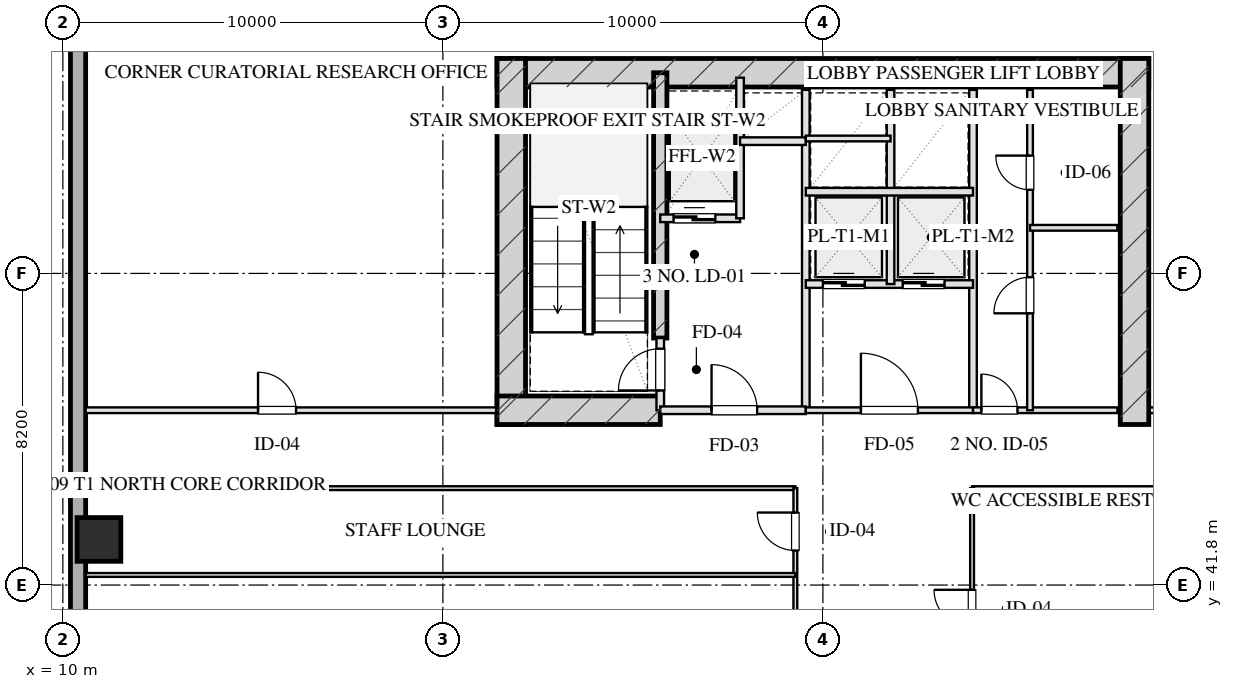
"""IFC4 building model, lengths in metres.
Left out: names, types, materials, properties, quantities, classifications, styles, units other than length and angle.
Written with IfcOpenShell. Run it as: python <this file> out.ifc"""

import sys

from ifc_helpers import new_model, si_unit, direction, frame, frame_2d, origin, origin_2d, place, context, subcontext, project, spatial, rectangle, hollow_rectangle, extrude, element, fill, save


model = new_model("IFC4")
c1 = context("Model", 3, precision=1e-05, world=origin(), true_north=direction((0.0, 1.0)))
c2 = subcontext(c1, "Body", "Model", "MODEL_VIEW")
j1 = project(units=[si_unit("LENGTHUNIT", "METRE"), si_unit("PLANEANGLEUNIT", "RADIAN")], contexts=[c1])
p1 = place(None, origin())
s1 = spatial("IfcSite", under=j1, at=p1, CompositionType="ELEMENT")
p2 = place(p1, origin())
s2 = spatial("IfcBuilding", under=s1, at=p2, CompositionType="ELEMENT")
p3 = place(p2, frame((0.0, 0.0, 42.0)))
s3 = spatial("IfcBuildingStorey", under=s2, at=p3, CompositionType="ELEMENT", Elevation=42.0)
p4 = place(p3, frame((21.425, 55.28, 0.0), z_axis=(0.0, 0.0, 1.0), x_axis=(1.0, 0.0, 0.0)))
e1 = element("IfcWall", 1, at=p4, inside=s3, PredefinedType="SHEAR", context=c2, shape_type="SweptSolid", body=[
    extrude(rectangle(XDim=17.15, YDim=0.75, at=frame_2d((8.575, 0.0))), origin(), (0.0, 0.0, 1.0), 4.0),
])
for number, where, z_axis, x_axis in (
    (2, (21.8, 46.025, 0.0), (0.0, 0.0, 1.0), (0.0, 1.0, 0.0)),
    (3, (38.2, 46.025, 0.0), (0.0, 0.0, 1.0), (0.0, 1.0, 0.0)),
):
    element("IfcWall", number, at=place(p3, frame(where, z_axis=z_axis, x_axis=x_axis)), inside=s3, PredefinedType="SHEAR", context=c2, shape_type="SweptSolid", body=[
        extrude(rectangle(XDim=9.63, YDim=0.75, at=frame_2d((4.815, 0.0))), origin(), (0.0, 0.0, 1.0), 4.0),
    ])
p5 = place(p3, frame((25.72, 48.3, 0.0), z_axis=(0.0, 0.0, 1.0), x_axis=(0.0, 1.0, 0.0)))
e4 = element("IfcWall", 4, at=p5, inside=s3, PredefinedType="SHEAR", context=c2, shape_type="SweptSolid", body=[
    extrude(rectangle(XDim=6.98, YDim=0.35, at=frame_2d((3.49, 0.0))), origin(), (0.0, 0.0, 1.0), 4.0),
])
p6 = place(p3, frame((21.425, 46.4, 0.0), z_axis=(0.0, 0.0, 1.0), x_axis=(1.0, 0.0, 0.0)))
e5 = element("IfcWall", 5, at=p6, inside=s3, PredefinedType="SHEAR", context=c2, shape_type="SweptSolid", body=[
    extrude(rectangle(XDim=4.295, YDim=0.75, at=frame_2d((2.147, 0.0))), origin(), (0.0, 0.0, 1.0), 4.0),
])
p7 = place(p3, frame((10.95, 43.0, 0.0), z_axis=(0.0, 0.0, 1.0), x_axis=(1.0, 0.0, 0.0)))
e6 = element("IfcColumn", 6, at=p7, inside=s3, PredefinedType="COLUMN", context=c2, shape_type="SweptSolid", body=[
    extrude(hollow_rectangle(XDim=1.15, YDim=1.15, WallThickness=0.04, at=origin_2d()), origin(), (0.0, 0.0, 1.0), 4.001),
])
p8 = place(p3, frame((10.4, 7.2, 0.0), z_axis=(0.0, 0.0, 1.0), x_axis=(0.0, 1.0, 0.0)))
e7 = element("IfcWall", 7, at=p8, inside=s3, PredefinedType="SOLIDWALL", context=c2, shape_type="SweptSolid", body=[
    extrude(rectangle(XDim=53.6, YDim=0.4, at=frame_2d((26.8, 0.0))), origin(), (0.0, 0.0, 1.0), 3.1),
])
p9 = place(p8, frame((28.15, 0.0, 0.75)))
e8 = element("IfcOpeningElement", 8, at=p9, cuts=e7, PredefinedType="OPENING", context=c2, shape_type="SweptSolid", body=[
    extrude(rectangle(XDim=2.5, YDim=1.75, at=frame_2d((1.25, 0.875))), frame((0.0, 0.21, 0.0), z_axis=(0.0, -1.0, 0.0), x_axis=(1.0, 0.0, 0.0)), (0.0, 0.0, 1.0), 0.42),
])
p10 = place(p3, frame((25.72, 46.4, 0.0), z_axis=(0.0, 0.0, 1.0), x_axis=(0.0, 1.0, 0.0)))
e9 = element("IfcWall", 9, at=p10, inside=s3, PredefinedType="PARTITIONING", context=c2, shape_type="SweptSolid", body=[
    extrude(rectangle(XDim=1.9, YDim=0.2, at=frame_2d((0.95, 0.0))), origin(), (0.0, 0.0, 1.0), 3.705),
])
p11 = place(p10, frame((0.52, 0.0, 0.0)))
e10 = element("IfcOpeningElement", 10, at=p11, cuts=e9, PredefinedType="OPENING", context=c2, shape_type="SweptSolid", body=[
    extrude(rectangle(XDim=1.1, YDim=2.05, at=frame_2d((0.55, 1.025))), frame((0.0, 0.11, 0.0), z_axis=(0.0, -1.0, 0.0), x_axis=(1.0, 0.0, 0.0)), (0.0, 0.0, 1.0), 0.22),
])
p12 = place(p3, frame((29.55, 46.4, 0.0), z_axis=(0.0, 0.0, 1.0), x_axis=(0.0, 1.0, 0.0)))
e11 = element("IfcWall", 11, at=p12, inside=s3, PredefinedType="PARTITIONING", context=c2, shape_type="SweptSolid", body=[
    extrude(rectangle(XDim=8.43, YDim=0.2, at=frame_2d((4.215, 0.0))), origin(), (0.0, 0.0, 1.0), 3.705),
])
p13 = place(p3, frame((25.72, 46.4, 0.0), z_axis=(0.0, 0.0, 1.0), x_axis=(1.0, 0.0, 0.0)))
e12 = element("IfcWall", 12, at=p13, inside=s3, PredefinedType="PARTITIONING", context=c2, shape_type="SweptSolid", body=[
    extrude(rectangle(XDim=3.83, YDim=0.2, at=frame_2d((1.915, 0.0))), origin(), (0.0, 0.0, 1.0), 3.705),
])
p14 = place(p13, frame((1.35, 0.0, 0.0)))
e13 = element("IfcOpeningElement", 13, at=p14, cuts=e12, PredefinedType="OPENING", context=c2, shape_type="SweptSolid", body=[
    extrude(rectangle(XDim=1.2, YDim=2.05, at=frame_2d((0.6, 1.025))), frame((0.0, 0.11, 0.0), z_axis=(0.0, -1.0, 0.0), x_axis=(1.0, 0.0, 0.0)), (0.0, 0.0, 1.0), 0.22),
])
p15 = place(p3, frame((25.72, 51.45, 0.0), z_axis=(0.0, 0.0, 1.0), x_axis=(1.0, 0.0, 0.0)))
e14 = element("IfcWall", 14, at=p15, inside=s3, PredefinedType="PARTITIONING", context=c2, shape_type="SweptSolid", body=[
    extrude(rectangle(XDim=2.1, YDim=0.2, at=frame_2d((1.05, 0.0))), origin(), (0.0, 0.0, 1.0), 3.705),
])
p16 = place(p15, frame((0.35, 0.0, 0.0)))
e15 = element("IfcOpeningElement", 15, at=p16, cuts=e14, PredefinedType="OPENING", context=c2, shape_type="SweptSolid", body=[
    extrude(rectangle(XDim=1.1, YDim=2.05, at=frame_2d((0.55, 1.025))), frame((0.0, 0.11, 0.0), z_axis=(0.0, -1.0, 0.0), x_axis=(1.0, 0.0, 0.0)), (0.0, 0.0, 1.0), 0.22),
])
p17 = place(p3, frame((27.82, 51.45, 0.0), z_axis=(0.0, 0.0, 1.0), x_axis=(0.0, 1.0, 0.0)))
e16 = element("IfcWall", 16, at=p17, inside=s3, PredefinedType="PARTITIONING", context=c2, shape_type="SweptSolid", body=[
    extrude(rectangle(XDim=3.7, YDim=0.2, at=frame_2d((1.85, 0.0))), origin(), (0.0, 0.0, 1.0), 3.705),
])
p18 = place(p3, frame((27.82, 53.48, 0.0), z_axis=(0.0, 0.0, 1.0), x_axis=(1.0, 0.0, 0.0)))
e17 = element("IfcWall", 17, at=p18, inside=s3, PredefinedType="PARTITIONING", context=c2, shape_type="SweptSolid", body=[
    extrude(rectangle(XDim=1.73, YDim=0.2, at=frame_2d((0.865, 0.0))), origin(), (0.0, 0.0, 1.0), 3.705),
])
p19 = place(p3, frame((33.95, 46.4, 0.0), z_axis=(0.0, 0.0, 1.0), x_axis=(0.0, 1.0, 0.0)))
e18 = element("IfcWall", 18, at=p19, inside=s3, PredefinedType="PARTITIONING", context=c2, shape_type="SweptSolid", body=[
    extrude(rectangle(XDim=8.43, YDim=0.2, at=frame_2d((4.215, 0.0))), origin(), (0.0, 0.0, 1.0), 3.705),
])
p20 = place(p3, frame((29.55, 46.4, 0.0), z_axis=(0.0, 0.0, 1.0), x_axis=(1.0, 0.0, 0.0)))
e19 = element("IfcWall", 19, at=p20, inside=s3, PredefinedType="PARTITIONING", context=c2, shape_type="SweptSolid", body=[
    extrude(rectangle(XDim=4.4, YDim=0.15, at=frame_2d((2.2, 0.0))), origin(), (0.0, 0.0, 1.0), 3.705),
])
p21 = place(p20, frame((1.45, 0.0, 0.0)))
e20 = element("IfcOpeningElement", 20, at=p21, cuts=e19, PredefinedType="OPENING", context=c2, shape_type="SweptSolid", body=[
    extrude(rectangle(XDim=1.5, YDim=2.05, at=frame_2d((0.75, 1.025))), frame((0.0, 0.085, 0.0), z_axis=(0.0, -1.0, 0.0), x_axis=(1.0, 0.0, 0.0)), (0.0, 0.0, 1.0), 0.17),
])
p22 = place(p3, frame((29.55, 49.72, 0.0), z_axis=(0.0, 0.0, 1.0), x_axis=(1.0, 0.0, 0.0)))
e21 = element("IfcWall", 21, at=p22, inside=s3, PredefinedType="PARTITIONING", context=c2, shape_type="SweptSolid", body=[
    extrude(rectangle(XDim=4.4, YDim=0.2, at=frame_2d((2.2, 0.0))), origin(), (0.0, 0.0, 1.0), 3.705),
])
p23 = place(p22, frame((0.45, 0.0, 0.0)))
e22 = element("IfcOpeningElement", 22, at=p23, cuts=e21, PredefinedType="OPENING", context=c2, shape_type="SweptSolid", body=[
    extrude(rectangle(XDim=1.1, YDim=2.05, at=frame_2d((0.55, 1.025))), frame((0.0, 0.11, 0.0), z_axis=(0.0, -1.0, 0.0), x_axis=(1.0, 0.0, 0.0)), (0.0, 0.0, 1.0), 0.22),
])
p24 = place(p22, frame((2.55, 0.0, 0.0)))
e23 = element("IfcOpeningElement", 23, at=p24, cuts=e21, PredefinedType="OPENING", context=c2, shape_type="SweptSolid", body=[
    extrude(rectangle(XDim=1.1, YDim=2.05, at=frame_2d((0.55, 1.025))), frame((0.0, 0.11, 0.0), z_axis=(0.0, -1.0, 0.0), x_axis=(1.0, 0.0, 0.0)), (0.0, 0.0, 1.0), 0.22),
])
p25 = place(p3, frame((31.78, 49.72, 0.0), z_axis=(0.0, 0.0, 1.0), x_axis=(0.0, 1.0, 0.0)))
e24 = element("IfcWall", 24, at=p25, inside=s3, PredefinedType="PARTITIONING", context=c2, shape_type="SweptSolid", body=[
    extrude(rectangle(XDim=5.11, YDim=0.2, at=frame_2d((2.555, 0.0))), origin(), (0.0, 0.0, 1.0), 3.705),
])
p26 = place(p3, frame((29.55, 52.15, 0.0), z_axis=(0.0, 0.0, 1.0), x_axis=(1.0, 0.0, 0.0)))
e25 = element("IfcWall", 25, at=p26, inside=s3, PredefinedType="PARTITIONING", context=c2, shape_type="SweptSolid", body=[
    extrude(rectangle(XDim=4.4, YDim=0.2, at=frame_2d((2.2, 0.0))), origin(), (0.0, 0.0, 1.0), 3.705),
])
p27 = place(p3, frame((29.55, 53.55, 0.0), z_axis=(0.0, 0.0, 1.0), x_axis=(1.0, 0.0, 0.0)))
e26 = element("IfcWall", 26, at=p27, inside=s3, PredefinedType="PARTITIONING", context=c2, shape_type="SweptSolid", body=[
    extrude(rectangle(XDim=2.23, YDim=0.15, at=frame_2d((1.115, 0.0))), origin(), (0.0, 0.0, 1.0), 3.705),
])
p28 = place(p3, frame((33.95, 46.4, 0.0), z_axis=(0.0, 0.0, 1.0), x_axis=(1.0, 0.0, 0.0)))
e27 = element("IfcWall", 27, at=p28, inside=s3, PredefinedType="PARTITIONING", context=c2, shape_type="SweptSolid", body=[
    extrude(rectangle(XDim=3.8, YDim=0.15, at=frame_2d((1.9, 0.0))), origin(), (0.0, 0.0, 1.0), 3.705),
])
p29 = place(p28, frame((0.22, 0.0, 0.0)))
e28 = element("IfcOpeningElement", 28, at=p29, cuts=e27, PredefinedType="OPENING", context=c2, shape_type="SweptSolid", body=[
    extrude(rectangle(XDim=0.95, YDim=2.05, at=frame_2d((0.475, 1.025))), frame((0.0, 0.085, 0.0), z_axis=(0.0, -1.0, 0.0), x_axis=(1.0, 0.0, 0.0)), (0.0, 0.0, 1.0), 0.17),
])
p30 = place(p3, frame((35.45, 46.4, 0.0), z_axis=(0.0, 0.0, 1.0), x_axis=(0.0, 1.0, 0.0)))
e29 = element("IfcWall", 29, at=p30, inside=s3, PredefinedType="PARTITIONING", context=c2, shape_type="SweptSolid", body=[
    extrude(rectangle(XDim=8.43, YDim=0.15, at=frame_2d((4.215, 0.0))), origin(), (0.0, 0.0, 1.0), 3.345),
])
p31 = place(p30, frame((2.55, 0.0, 0.0)))
e30 = element("IfcOpeningElement", 30, at=p31, cuts=e29, PredefinedType="OPENING", context=c2, shape_type="SweptSolid", body=[
    extrude(rectangle(XDim=0.95, YDim=2.05, at=frame_2d((0.475, 1.025))), frame((0.0, 0.085, 0.0), z_axis=(0.0, -1.0, 0.0), x_axis=(1.0, 0.0, 0.0)), (0.0, 0.0, 1.0), 0.17),
])
p32 = place(p30, frame((5.8, 0.0, 0.0)))
e31 = element("IfcOpeningElement", 31, at=p32, cuts=e29, PredefinedType="OPENING", context=c2, shape_type="SweptSolid", body=[
    extrude(rectangle(XDim=0.9, YDim=2.05, at=frame_2d((0.45, 1.025))), frame((0.0, 0.085, 0.0), z_axis=(0.0, -1.0, 0.0), x_axis=(1.0, 0.0, 0.0)), (0.0, 0.0, 1.0), 0.17),
])
p33 = place(p3, frame((35.45, 51.2, 0.0), z_axis=(0.0, 0.0, 1.0), x_axis=(1.0, 0.0, 0.0)))
e32 = element("IfcWall", 32, at=p33, inside=s3, PredefinedType="PARTITIONING", context=c2, shape_type="SweptSolid", body=[
    extrude(rectangle(XDim=2.3, YDim=0.15, at=frame_2d((1.15, 0.0))), origin(), (0.0, 0.0, 1.0), 3.705),
])
p34 = place(p3, frame((10.6, 46.4, 0.0), z_axis=(0.0, 0.0, 1.0), x_axis=(1.0, 0.0, 0.0)))
e33 = element("IfcWall", 33, at=p34, inside=s3, PredefinedType="PARTITIONING", context=c2, shape_type="SweptSolid", body=[
    extrude(rectangle(XDim=10.8, YDim=0.15, at=frame_2d((5.4, 0.0))), origin(), (0.0, 0.0, 1.0), 3.705),
])
p35 = place(p34, frame((4.536, 0.0, 0.0)))
e34 = element("IfcOpeningElement", 34, at=p35, cuts=e33, PredefinedType="OPENING", context=c2, shape_type="SweptSolid", body=[
    extrude(rectangle(XDim=1.0, YDim=2.05, at=frame_2d((0.5, 1.025))), frame((0.0, 0.085, 0.0), z_axis=(0.0, -1.0, 0.0), x_axis=(1.0, 0.0, 0.0)), (0.0, 0.0, 1.0), 0.17),
])
p36 = place(p3, frame((38.6, 46.4, 0.0), z_axis=(0.0, 0.0, 1.0), x_axis=(1.0, 0.0, 0.0)))
e35 = element("IfcWall", 35, at=p36, inside=s3, PredefinedType="PARTITIONING", context=c2, shape_type="SweptSolid", body=[
    extrude(rectangle(XDim=10.8, YDim=0.15, at=frame_2d((5.4, 0.0))), origin(), (0.0, 0.0, 1.0), 3.705),
])
p37 = place(p36, frame((4.536, 0.0, 0.0)))
e36 = element("IfcOpeningElement", 36, at=p37, cuts=e35, PredefinedType="OPENING", context=c2, shape_type="SweptSolid", body=[
    extrude(rectangle(XDim=1.0, YDim=2.05, at=frame_2d((0.5, 1.025))), frame((0.0, 0.085, 0.0), z_axis=(0.0, -1.0, 0.0), x_axis=(1.0, 0.0, 0.0)), (0.0, 0.0, 1.0), 0.17),
])
p38 = place(p3, frame((10.6, 44.35, 0.0), z_axis=(0.0, 0.0, 1.0), x_axis=(1.0, 0.0, 0.0)))
e37 = element("IfcWall", 37, at=p38, inside=s3, PredefinedType="MOVABLE", context=c2, shape_type="SweptSolid", body=[
    extrude(rectangle(XDim=18.675, YDim=0.1, at=frame_2d((9.337, 0.0))), origin(), (0.0, 0.0, 1.0), 3.705),
])
p39 = place(p3, frame((33.925, 44.35, 0.0), z_axis=(0.0, 0.0, 1.0), x_axis=(1.0, 0.0, 0.0)))
e38 = element("IfcWall", 38, at=p39, inside=s3, PredefinedType="MOVABLE", context=c2, shape_type="SweptSolid", body=[
    extrude(rectangle(XDim=15.475, YDim=0.1, at=frame_2d((7.737, 0.0))), origin(), (0.0, 0.0, 1.0), 3.705),
])
p40 = place(p3, frame((29.275, 23.65, 0.0), z_axis=(0.0, 0.0, 1.0), x_axis=(0.0, 1.0, 0.0)))
e39 = element("IfcWall", 39, at=p40, inside=s3, PredefinedType="MOVABLE", context=c2, shape_type="SweptSolid", body=[
    extrude(rectangle(XDim=20.7, YDim=0.1, at=frame_2d((10.35, 0.0))), origin(), (0.0, 0.0, 1.0), 3.705),
])
p41 = place(p40, frame((0.775, 0.0, 0.0)))
e40 = element("IfcOpeningElement", 40, at=p41, cuts=e39, PredefinedType="OPENING", context=c2, shape_type="SweptSolid", body=[
    extrude(rectangle(XDim=1.0, YDim=2.05, at=frame_2d((0.5, 1.025))), frame((0.0, 0.06, 0.0), z_axis=(0.0, -1.0, 0.0), x_axis=(1.0, 0.0, 0.0)), (0.0, 0.0, 1.0), 0.12),
])
p42 = place(p40, frame((3.95, 0.0, 0.0)))
e41 = element("IfcOpeningElement", 41, at=p42, cuts=e39, PredefinedType="OPENING", context=c2, shape_type="SweptSolid", body=[
    extrude(rectangle(XDim=1.0, YDim=2.05, at=frame_2d((0.5, 1.025))), frame((0.0, 0.06, 0.0), z_axis=(0.0, -1.0, 0.0), x_axis=(1.0, 0.0, 0.0)), (0.0, 0.0, 1.0), 0.12),
])
p43 = place(p40, frame((8.364, 0.0, 0.0)))
e42 = element("IfcOpeningElement", 42, at=p43, cuts=e39, PredefinedType="OPENING", context=c2, shape_type="SweptSolid", body=[
    extrude(rectangle(XDim=1.0, YDim=2.05, at=frame_2d((0.5, 1.025))), frame((0.0, 0.06, 0.0), z_axis=(0.0, -1.0, 0.0), x_axis=(1.0, 0.0, 0.0)), (0.0, 0.0, 1.0), 0.12),
])
p44 = place(p40, frame((12.864, 0.0, 0.0)))
e43 = element("IfcOpeningElement", 43, at=p44, cuts=e39, PredefinedType="OPENING", context=c2, shape_type="SweptSolid", body=[
    extrude(rectangle(XDim=1.05, YDim=2.05, at=frame_2d((0.525, 1.025))), frame((0.0, 0.06, 0.0), z_axis=(0.0, -1.0, 0.0), x_axis=(1.0, 0.0, 0.0)), (0.0, 0.0, 1.0), 0.12),
])
p45 = place(p40, frame((16.383, 0.0, 0.0)))
e44 = element("IfcOpeningElement", 44, at=p45, cuts=e39, PredefinedType="OPENING", context=c2, shape_type="SweptSolid", body=[
    extrude(rectangle(XDim=0.85, YDim=2.05, at=frame_2d((0.425, 1.025))), frame((0.0, 0.06, 0.0), z_axis=(0.0, -1.0, 0.0), x_axis=(1.0, 0.0, 0.0)), (0.0, 0.0, 1.0), 0.12),
])
p46 = place(p40, frame((19.058, 0.0, 0.0)))
e45 = element("IfcOpeningElement", 45, at=p46, cuts=e39, PredefinedType="OPENING", context=c2, shape_type="SweptSolid", body=[
    extrude(rectangle(XDim=1.0, YDim=2.05, at=frame_2d((0.5, 1.025))), frame((0.0, 0.06, 0.0), z_axis=(0.0, -1.0, 0.0), x_axis=(1.0, 0.0, 0.0)), (0.0, 0.0, 1.0), 0.12),
])
p47 = place(p3, frame((33.925, 23.65, 0.0), z_axis=(0.0, 0.0, 1.0), x_axis=(0.0, 1.0, 0.0)))
e46 = element("IfcWall", 46, at=p47, inside=s3, PredefinedType="MOVABLE", context=c2, shape_type="SweptSolid", body=[
    extrude(rectangle(XDim=20.7, YDim=0.1, at=frame_2d((10.35, 0.0))), origin(), (0.0, 0.0, 1.0), 3.705),
])
p48 = place(p47, frame((2.675, 0.0, 0.0)))
e47 = element("IfcOpeningElement", 47, at=p48, cuts=e46, PredefinedType="OPENING", context=c2, shape_type="SweptSolid", body=[
    extrude(rectangle(XDim=1.0, YDim=2.05, at=frame_2d((0.5, 1.025))), frame((0.0, 0.06, 0.0), z_axis=(0.0, -1.0, 0.0), x_axis=(1.0, 0.0, 0.0)), (0.0, 0.0, 1.0), 0.12),
])
p49 = place(p47, frame((9.85, 0.0, 0.0)))
e48 = element("IfcOpeningElement", 48, at=p49, cuts=e46, PredefinedType="OPENING", context=c2, shape_type="SweptSolid", body=[
    extrude(rectangle(XDim=1.0, YDim=2.05, at=frame_2d((0.5, 1.025))), frame((0.0, 0.06, 0.0), z_axis=(0.0, -1.0, 0.0), x_axis=(1.0, 0.0, 0.0)), (0.0, 0.0, 1.0), 0.12),
])
p50 = place(p47, frame((17.025, 0.0, 0.0)))
e49 = element("IfcOpeningElement", 49, at=p50, cuts=e46, PredefinedType="OPENING", context=c2, shape_type="SweptSolid", body=[
    extrude(rectangle(XDim=1.0, YDim=2.05, at=frame_2d((0.5, 1.025))), frame((0.0, 0.06, 0.0), z_axis=(0.0, -1.0, 0.0), x_axis=(1.0, 0.0, 0.0)), (0.0, 0.0, 1.0), 0.12),
])
p51 = place(p3, frame((10.6, 42.066, 0.0), z_axis=(0.0, 0.0, 1.0), x_axis=(1.0, 0.0, 0.0)))
e50 = element("IfcWall", 50, at=p51, inside=s3, PredefinedType="MOVABLE", context=c2, shape_type="SweptSolid", body=[
    extrude(rectangle(XDim=18.675, YDim=0.1, at=frame_2d((9.337, 0.0))), origin(), (0.0, 0.0, 1.0), 3.705),
])
p52 = place(p11, origin())
e51 = element("IfcDoor", 51, at=p52, inside=s3, OperationType="SINGLE_SWING_LEFT", PredefinedType="DOOR", context=c2, shape_type="SweptSolid", body=[
    extrude(rectangle(XDim=1.1, YDim=2.05, at=frame_2d((0.55, 1.025))), frame((0.0, 0.025, 0.0), z_axis=(0.0, -1.0, 0.0), x_axis=(1.0, 0.0, 0.0)), (0.0, 0.0, 1.0), 0.05),
])
fill(e10, e51)
p53 = place(p14, origin())
e52 = element("IfcDoor", 52, at=p53, inside=s3, OperationType="SINGLE_SWING_LEFT", PredefinedType="DOOR", context=c2, shape_type="SweptSolid", body=[
    extrude(rectangle(XDim=1.2, YDim=2.05, at=frame_2d((0.6, 1.025))), frame((0.0, 0.025, 0.0), z_axis=(0.0, -1.0, 0.0), x_axis=(1.0, 0.0, 0.0)), (0.0, 0.0, 1.0), 0.05),
])
fill(e13, e52)
p54 = place(p16, origin())
e53 = element("IfcDoor", 53, at=p54, inside=s3, OperationType="DOUBLE_DOOR_SLIDING", PredefinedType="DOOR", context=c2, shape_type="SweptSolid", body=[
    extrude(rectangle(XDim=1.1, YDim=2.05, at=frame_2d((0.55, 1.025))), frame((0.0, 0.025, 0.0), z_axis=(0.0, -1.0, 0.0), x_axis=(1.0, 0.0, 0.0)), (0.0, 0.0, 1.0), 0.05),
])
fill(e15, e53)
p55 = place(p21, origin())
e54 = element("IfcDoor", 54, at=p55, inside=s3, OperationType="SINGLE_SWING_LEFT", PredefinedType="DOOR", context=c2, shape_type="SweptSolid", body=[
    extrude(rectangle(XDim=1.5, YDim=2.05, at=frame_2d((0.75, 1.025))), frame((0.0, 0.025, 0.0), z_axis=(0.0, -1.0, 0.0), x_axis=(1.0, 0.0, 0.0)), (0.0, 0.0, 1.0), 0.05),
])
fill(e20, e54)
p56 = place(p23, origin())
e55 = element("IfcDoor", 55, at=p56, inside=s3, OperationType="DOUBLE_DOOR_SLIDING", PredefinedType="DOOR", context=c2, shape_type="SweptSolid", body=[
    extrude(rectangle(XDim=1.1, YDim=2.05, at=frame_2d((0.55, 1.025))), frame((0.0, 0.025, 0.0), z_axis=(0.0, -1.0, 0.0), x_axis=(1.0, 0.0, 0.0)), (0.0, 0.0, 1.0), 0.05),
])
fill(e22, e55)
p57 = place(p24, origin())
e56 = element("IfcDoor", 56, at=p57, inside=s3, OperationType="DOUBLE_DOOR_SLIDING", PredefinedType="DOOR", context=c2, shape_type="SweptSolid", body=[
    extrude(rectangle(XDim=1.1, YDim=2.05, at=frame_2d((0.55, 1.025))), frame((0.0, 0.025, 0.0), z_axis=(0.0, -1.0, 0.0), x_axis=(1.0, 0.0, 0.0)), (0.0, 0.0, 1.0), 0.05),
])
fill(e23, e56)
p58 = place(p29, origin())
e57 = element("IfcDoor", 57, at=p58, inside=s3, OperationType="SINGLE_SWING_LEFT", PredefinedType="DOOR", context=c2, shape_type="SweptSolid", body=[
    extrude(rectangle(XDim=0.95, YDim=2.05, at=frame_2d((0.475, 1.025))), frame((0.0, 0.025, 0.0), z_axis=(0.0, -1.0, 0.0), x_axis=(1.0, 0.0, 0.0)), (0.0, 0.0, 1.0), 0.05),
])
fill(e28, e57)
p59 = place(p31, origin())
e58 = element("IfcDoor", 58, at=p59, inside=s3, OperationType="SINGLE_SWING_LEFT", PredefinedType="DOOR", context=c2, shape_type="SweptSolid", body=[
    extrude(rectangle(XDim=0.95, YDim=2.05, at=frame_2d((0.475, 1.025))), frame((0.0, 0.025, 0.0), z_axis=(0.0, -1.0, 0.0), x_axis=(1.0, 0.0, 0.0)), (0.0, 0.0, 1.0), 0.05),
])
fill(e30, e58)
p60 = place(p32, origin())
e59 = element("IfcDoor", 59, at=p60, inside=s3, OperationType="SINGLE_SWING_RIGHT", PredefinedType="DOOR", context=c2, shape_type="SweptSolid", body=[
    extrude(rectangle(XDim=0.9, YDim=2.05, at=frame_2d((0.45, 1.025))), frame((0.0, 0.025, 0.0), z_axis=(0.0, -1.0, 0.0), x_axis=(1.0, 0.0, 0.0)), (0.0, 0.0, 1.0), 0.05),
])
fill(e31, e59)
p61 = place(p35, origin())
e60 = element("IfcDoor", 60, at=p61, inside=s3, OperationType="SINGLE_SWING_LEFT", PredefinedType="DOOR", context=c2, shape_type="SweptSolid", body=[
    extrude(rectangle(XDim=1.0, YDim=2.05, at=frame_2d((0.5, 1.025))), frame((0.0, 0.025, 0.0), z_axis=(0.0, -1.0, 0.0), x_axis=(1.0, 0.0, 0.0)), (0.0, 0.0, 1.0), 0.05),
])
fill(e34, e60)
p62 = place(p46, origin())
e61 = element("IfcDoor", 61, at=p62, inside=s3, OperationType="SINGLE_SWING_RIGHT", PredefinedType="DOOR", context=c2, shape_type="SweptSolid", body=[
    extrude(rectangle(XDim=1.0, YDim=2.05, at=frame_2d((0.5, 1.025))), frame((0.0, 0.025, 0.0), z_axis=(0.0, -1.0, 0.0), x_axis=(1.0, 0.0, 0.0)), (0.0, 0.0, 1.0), 0.05),
])
fill(e45, e61)
p63 = place(p50, origin())
e62 = element("IfcDoor", 62, at=p63, inside=s3, OperationType="SINGLE_SWING_RIGHT", PredefinedType="DOOR", context=c2, shape_type="SweptSolid", body=[
    extrude(rectangle(XDim=1.0, YDim=2.05, at=frame_2d((0.5, 1.025))), frame((0.0, 0.025, 0.0), z_axis=(0.0, -1.0, 0.0), x_axis=(1.0, 0.0, 0.0)), (0.0, 0.0, 1.0), 0.05),
])
fill(e49, e62)
save(model, sys.argv[1])
